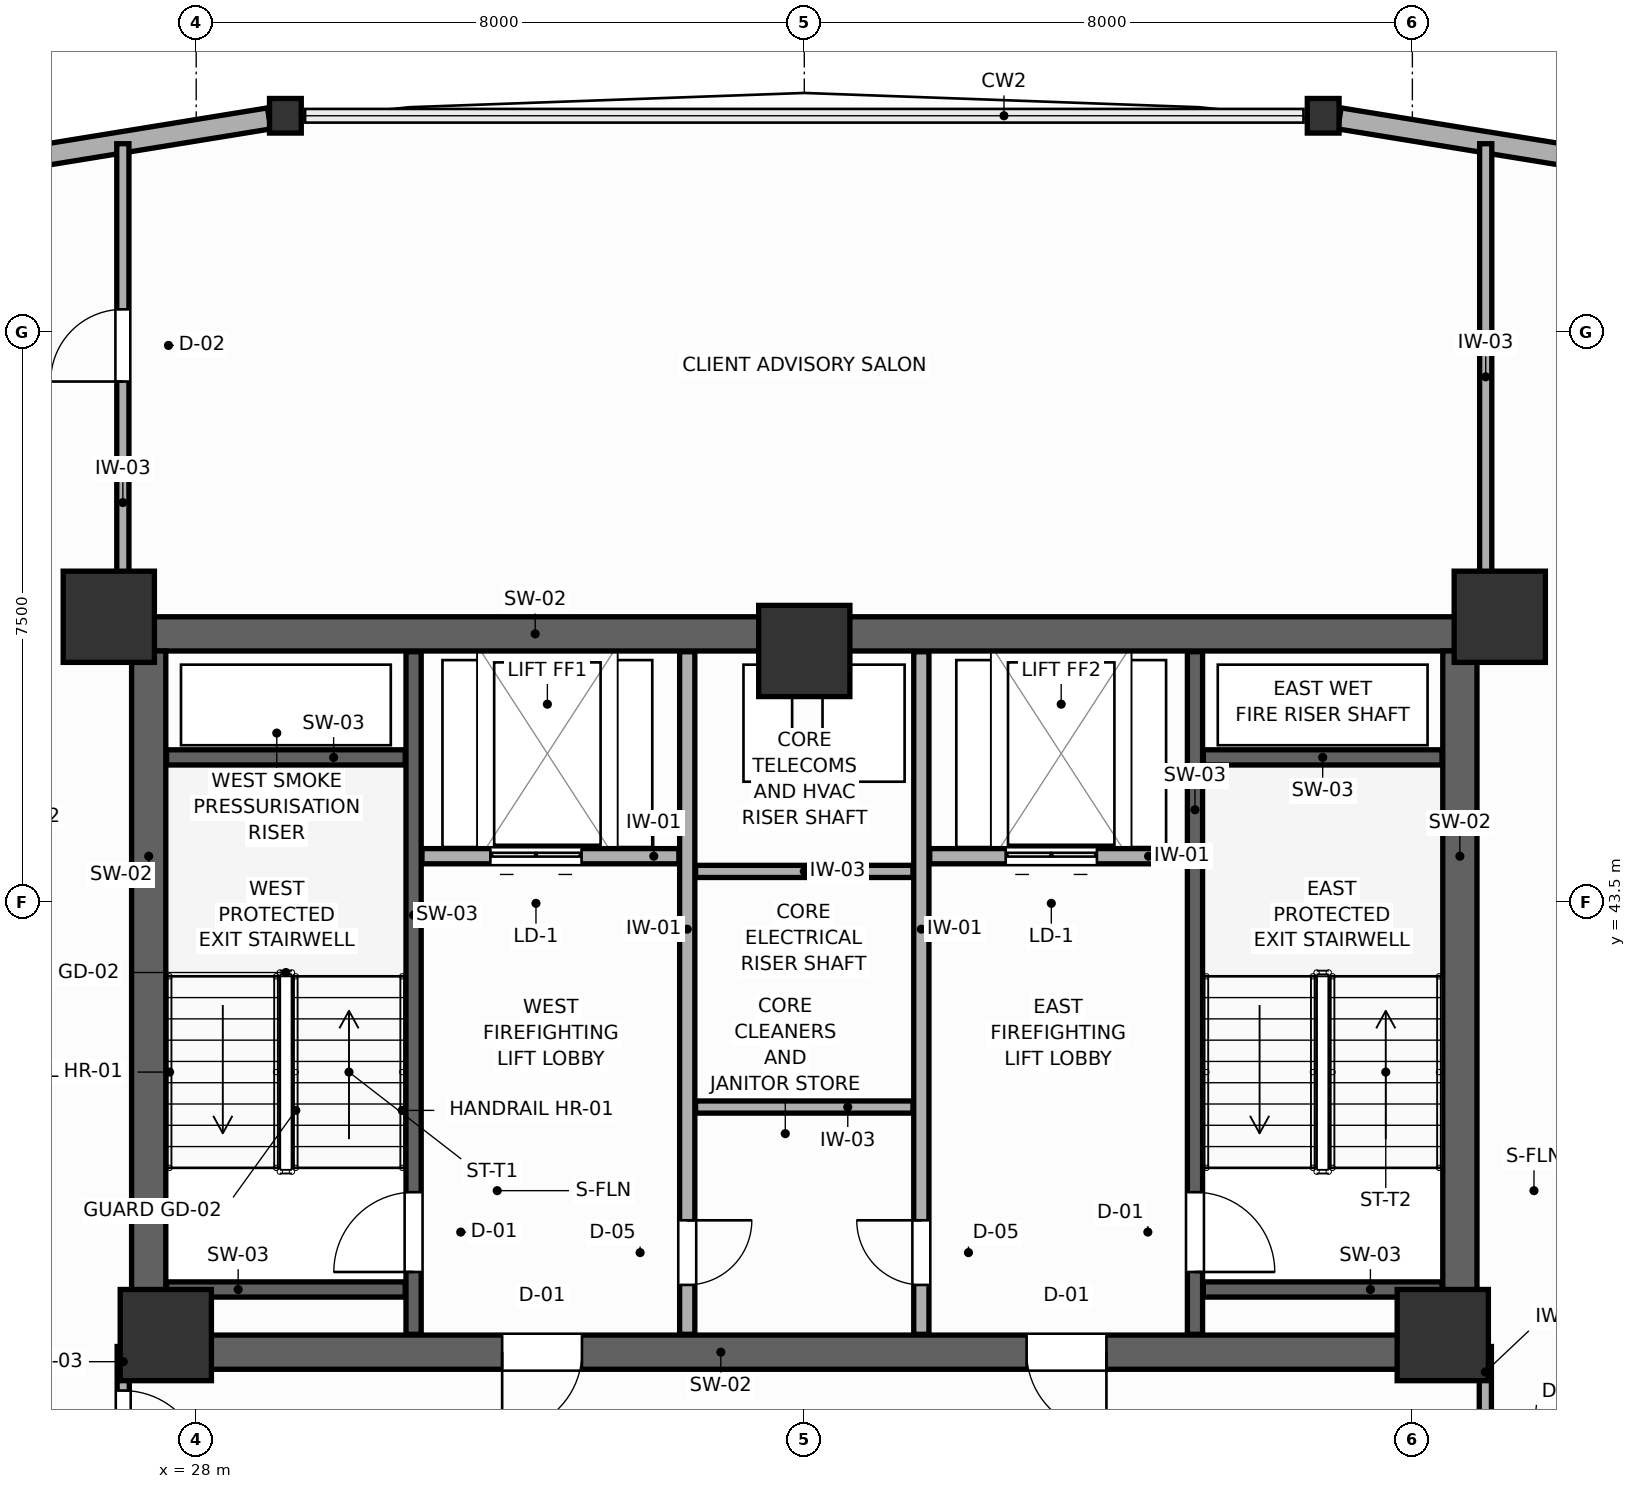
"""IFC4 building model, lengths in metres.
Left out: names, types, materials, properties, quantities, classifications, styles, units other than length and angle.
Written with IfcOpenShell. Run it as: python <this file> out.ifc"""

import sys

from ifc_helpers import new_model, si_unit, direction, frame, frame_2d, origin, origin_2d, place, context, subcontext, project, spatial, rectangle, i_section, extrude, source, transform, mapped, element, fill, save


model = new_model("IFC4")
c1 = context("Model", 3, precision=1e-05, world=origin(), true_north=direction((0.0, 1.0)))
c2 = subcontext(c1, "Body", "Model", "MODEL_VIEW")
j1 = project(units=[si_unit("LENGTHUNIT", "METRE"), si_unit("PLANEANGLEUNIT", "RADIAN")], contexts=[c1])
p1 = place(None, origin())
s1 = spatial("IfcSite", under=j1, at=p1, CompositionType="ELEMENT")
p2 = place(p1, origin())
s2 = spatial("IfcBuilding", under=s1, at=p2, CompositionType="ELEMENT")
p3 = place(p2, frame((0.0, 0.0, 124.2)))
s3 = spatial("IfcBuildingStorey", under=s2, at=p3, CompositionType="ELEMENT", Elevation=124.2)
p4 = place(p3, frame((27.15, 47.025, 0.0), z_axis=(0.0, 0.0, 1.0), x_axis=(1.0, 0.0, 0.0)))
e1 = element("IfcWall", 1, at=p4, inside=s3, PredefinedType="SHEAR", context=c2, shape_type="SweptSolid", body=[
    extrude(rectangle(XDim=17.7, YDim=0.45, at=frame_2d((8.85, 0.0))), origin(), (0.0, 0.0, 1.0), 3.6),
])
p5 = place(p3, frame((27.15, 37.575, 0.0), z_axis=(0.0, 0.0, 1.0), x_axis=(1.0, 0.0, 0.0)))
e2 = element("IfcWall", 2, at=p5, inside=s3, PredefinedType="SHEAR", context=c2, shape_type="SweptSolid", body=[
    extrude(rectangle(XDim=17.7, YDim=0.45, at=frame_2d((8.85, 0.0))), origin(), (0.0, 0.0, 1.0), 3.6),
])
p6 = place(p5, frame((4.875, 0.0, 0.0)))
e3 = element("IfcOpeningElement", 3, at=p6, cuts=e2, PredefinedType="OPENING", context=c2, shape_type="SweptSolid", body=[
    extrude(rectangle(XDim=1.05, YDim=2.1, at=frame_2d((0.525, 1.05))), frame((0.0, 0.235, 0.0), z_axis=(0.0, -1.0, 0.0), x_axis=(1.0, 0.0, 0.0)), (0.0, 0.0, 1.0), 0.47),
])
p7 = place(p5, frame((11.775, 0.0, 0.0)))
e4 = element("IfcOpeningElement", 4, at=p7, cuts=e2, PredefinedType="OPENING", context=c2, shape_type="SweptSolid", body=[
    extrude(rectangle(XDim=1.05, YDim=2.1, at=frame_2d((0.525, 1.05))), frame((0.0, 0.235, 0.0), z_axis=(0.0, -1.0, 0.0), x_axis=(1.0, 0.0, 0.0)), (0.0, 0.0, 1.0), 0.47),
])
for number, where, z_axis, x_axis in (
    (5, (27.375, 37.8, 0.0), (0.0, 0.0, 1.0), (0.0, 1.0, 0.0)),
    (6, (44.625, 37.8, 0.0), (0.0, 0.0, 1.0), (0.0, 1.0, 0.0)),
):
    element("IfcWall", number, at=place(p3, frame(where, z_axis=z_axis, x_axis=x_axis)), inside=s3, PredefinedType="SHEAR", context=c2, shape_type="SweptSolid", body=[
        extrude(rectangle(XDim=9.0, YDim=0.45, at=frame_2d((4.5, 0.0))), origin(), (0.0, 0.0, 1.0), 3.6),
    ])
m1 = source(origin(), c2, "Body", "SweptSolid", [
    extrude(rectangle(XDim=1.2, YDim=1.2, at=origin_2d()), origin(), (0.0, 0.0, 1.0), 3.6),
])
for number, where, z_axis, x_axis in (
    (7, (26.85, 47.25, 0.0), (0.0, 0.0, 1.0), (1.0, 0.0, 0.0)),
    (8, (45.15, 47.25, 0.0), (0.0, 0.0, 1.0), (1.0, 0.0, 0.0)),
    (9, (27.6, 37.8, 0.0), (0.0, 0.0, 1.0), (1.0, 0.0, 0.0)),
    (10, (44.4, 37.8, 0.0), (0.0, 0.0, 1.0), (1.0, 0.0, 0.0)),
    (11, (36.0, 46.8, 0.0), (0.0, 0.0, 1.0), (1.0, 0.0, 0.0)),
):
    element("IfcColumn", number, at=place(p3, frame(where, z_axis=z_axis, x_axis=x_axis)), inside=s3, PredefinedType="COLUMN", context=c2, shape_type="MappedRepresentation", body=[
        mapped(m1, transform((0.0, 0.0, 0.0), scale=1.0)),
    ])
m2 = source(origin(), c2, "Body", "SweptSolid", [
    extrude(i_section(OverallWidth=0.418, OverallDepth=0.455, WebThickness=0.039, FlangeThickness=0.063, FilletRadius=0.015, at=origin_2d()), origin(), (0.0, 0.0, 1.0), 3.6),
])
for number, where, z_axis, x_axis in (
    (12, (42.827, 53.841, 0.0), (0.0, 0.0, 1.0), (1.0, 0.0, 0.0)),
    (13, (29.173, 53.841, 0.0), (0.0, 0.0, 1.0), (1.0, 0.0, 0.0)),
):
    element("IfcColumn", number, at=place(p3, frame(where, z_axis=z_axis, x_axis=x_axis)), inside=s3, PredefinedType="COLUMN", context=c2, shape_type="MappedRepresentation", body=[
        mapped(m2, transform((0.0, 0.0, 0.0), scale=1.0)),
    ])
p8 = place(p3, frame((58.42, 51.306, 0.0), z_axis=(0.0, 0.0, 1.0), x_axis=(-0.987036263752, 0.160497395736, 0.0)))
e14 = element("IfcWall", 14, at=p8, inside=s3, PredefinedType="SOLIDWALL", context=c2, shape_type="SweptSolid", body=[
    extrude(rectangle(XDim=15.581, YDim=0.28, at=frame_2d((7.791, 0.0))), origin(), (0.0, 0.0, 1.0), 3.0),
])
p9 = place(p3, frame((28.959, 53.806, 0.0), z_axis=(0.0, 0.0, 1.0), x_axis=(-0.987036263752, -0.160497395736, 0.0)))
e15 = element("IfcWall", 15, at=p9, inside=s3, PredefinedType="SOLIDWALL", context=c2, shape_type="SweptSolid", body=[
    extrude(rectangle(XDim=15.581, YDim=0.28, at=frame_2d((7.791, 0.0))), origin(), (0.0, 0.0, 1.0), 2.95),
])
p10 = place(p3, frame((30.86, 37.81, 0.0), z_axis=(0.0, 0.0, 1.0), x_axis=(0.0, 1.0, 0.0)))
e16 = element("IfcWall", 16, at=p10, inside=s3, PredefinedType="SHEAR", context=c2, shape_type="SweptSolid", body=[
    extrude(rectangle(XDim=8.98, YDim=0.2, at=frame_2d((4.49, 0.0))), origin(), (0.0, 0.0, 1.0), 3.6),
])
p11 = place(p10, frame((0.82, 0.0, 0.0)))
e17 = element("IfcOpeningElement", 17, at=p11, cuts=e16, PredefinedType="OPENING", context=c2, shape_type="SweptSolid", body=[
    extrude(rectangle(XDim=1.05, YDim=2.1, at=frame_2d((0.525, 1.05))), frame((0.0, 0.11, 0.0), z_axis=(0.0, -1.0, 0.0), x_axis=(1.0, 0.0, 0.0)), (0.0, 0.0, 1.0), 0.22),
])
for number, where, z_axis, x_axis in (
    (18, (27.61, 45.4, 0.0), (0.0, 0.0, 1.0), (1.0, 0.0, 0.0)),
    (19, (27.61, 38.4, 0.0), (0.0, 0.0, 1.0), (1.0, 0.0, 0.0)),
):
    element("IfcWall", number, at=place(p3, frame(where, z_axis=z_axis, x_axis=x_axis)), inside=s3, PredefinedType="SHEAR", context=c2, shape_type="SweptSolid", body=[
        extrude(rectangle(XDim=3.14, YDim=0.2, at=frame_2d((1.57, 0.0))), origin(), (0.0, 0.0, 1.0), 3.6),
    ])
p12 = place(p3, frame((41.14, 37.81, 0.0), z_axis=(0.0, 0.0, 1.0), x_axis=(0.0, 1.0, 0.0)))
e20 = element("IfcWall", 20, at=p12, inside=s3, PredefinedType="SHEAR", context=c2, shape_type="SweptSolid", body=[
    extrude(rectangle(XDim=8.98, YDim=0.2, at=frame_2d((4.49, 0.0))), origin(), (0.0, 0.0, 1.0), 3.6),
])
p13 = place(p12, frame((0.82, 0.0, 0.0)))
e21 = element("IfcOpeningElement", 21, at=p13, cuts=e20, PredefinedType="OPENING", context=c2, shape_type="SweptSolid", body=[
    extrude(rectangle(XDim=1.05, YDim=2.1, at=frame_2d((0.525, 1.05))), frame((0.0, 0.11, 0.0), z_axis=(0.0, -1.0, 0.0), x_axis=(1.0, 0.0, 0.0)), (0.0, 0.0, 1.0), 0.22),
])
for number, where, z_axis, x_axis in (
    (22, (41.25, 45.4, 0.0), (0.0, 0.0, 1.0), (1.0, 0.0, 0.0)),
    (23, (41.25, 38.4, 0.0), (0.0, 0.0, 1.0), (1.0, 0.0, 0.0)),
):
    element("IfcWall", number, at=place(p3, frame(where, z_axis=z_axis, x_axis=x_axis)), inside=s3, PredefinedType="SHEAR", context=c2, shape_type="SweptSolid", body=[
        extrude(rectangle(XDim=3.14, YDim=0.2, at=frame_2d((1.57, 0.0))), origin(), (0.0, 0.0, 1.0), 3.6),
    ])
p14 = place(p3, frame((30.97, 44.1, 0.0), z_axis=(0.0, 0.0, 1.0), x_axis=(1.0, 0.0, 0.0)))
e24 = element("IfcWall", 24, at=p14, inside=s3, PredefinedType="PARTITIONING", context=c2, shape_type="SweptSolid", body=[
    extrude(rectangle(XDim=3.38, YDim=0.2, at=frame_2d((1.69, 0.0))), origin(), (0.0, 0.0, 1.0), 3.4),
])
p15 = place(p14, frame((0.9, 0.0, 0.0)))
e25 = element("IfcOpeningElement", 25, at=p15, cuts=e24, PredefinedType="OPENING", context=c2, shape_type="SweptSolid", body=[
    extrude(rectangle(XDim=1.2, YDim=2.1, at=frame_2d((0.6, 1.05))), frame((0.0, 0.11, 0.0), z_axis=(0.0, -1.0, 0.0), x_axis=(1.0, 0.0, 0.0)), (0.0, 0.0, 1.0), 0.22),
])
p16 = place(p3, frame((37.65, 44.1, 0.0), z_axis=(0.0, 0.0, 1.0), x_axis=(1.0, 0.0, 0.0)))
e26 = element("IfcWall", 26, at=p16, inside=s3, PredefinedType="PARTITIONING", context=c2, shape_type="SweptSolid", body=[
    extrude(rectangle(XDim=3.38, YDim=0.2, at=frame_2d((1.69, 0.0))), origin(), (0.0, 0.0, 1.0), 3.4),
])
p17 = place(p16, frame((1.0, 0.0, 0.0)))
e27 = element("IfcOpeningElement", 27, at=p17, cuts=e26, PredefinedType="OPENING", context=c2, shape_type="SweptSolid", body=[
    extrude(rectangle(XDim=1.2, YDim=2.1, at=frame_2d((0.6, 1.05))), frame((0.0, 0.11, 0.0), z_axis=(0.0, -1.0, 0.0), x_axis=(1.0, 0.0, 0.0)), (0.0, 0.0, 1.0), 0.22),
])
p18 = place(p3, frame((34.46, 37.81, 0.0), z_axis=(0.0, 0.0, 1.0), x_axis=(0.0, 1.0, 0.0)))
e28 = element("IfcWall", 28, at=p18, inside=s3, PredefinedType="PARTITIONING", context=c2, shape_type="SweptSolid", body=[
    extrude(rectangle(XDim=8.98, YDim=0.2, at=frame_2d((4.49, 0.0))), origin(), (0.0, 0.0, 1.0), 3.4),
])
p19 = place(p18, frame((0.65, 0.0, 0.0)))
e29 = element("IfcOpeningElement", 29, at=p19, cuts=e28, PredefinedType="OPENING", context=c2, shape_type="SweptSolid", body=[
    extrude(rectangle(XDim=0.85, YDim=2.05, at=frame_2d((0.425, 1.025))), frame((0.0, 0.11, 0.0), z_axis=(0.0, -1.0, 0.0), x_axis=(1.0, 0.0, 0.0)), (0.0, 0.0, 1.0), 0.22),
])
p20 = place(p3, frame((37.54, 37.81, 0.0), z_axis=(0.0, 0.0, 1.0), x_axis=(0.0, 1.0, 0.0)))
e30 = element("IfcWall", 30, at=p20, inside=s3, PredefinedType="PARTITIONING", context=c2, shape_type="SweptSolid", body=[
    extrude(rectangle(XDim=8.98, YDim=0.2, at=frame_2d((4.49, 0.0))), origin(), (0.0, 0.0, 1.0), 3.4),
])
p21 = place(p20, frame((0.65, 0.0, 0.0)))
e31 = element("IfcOpeningElement", 31, at=p21, cuts=e30, PredefinedType="OPENING", context=c2, shape_type="SweptSolid", body=[
    extrude(rectangle(XDim=0.85, YDim=2.05, at=frame_2d((0.425, 1.025))), frame((0.0, 0.11, 0.0), z_axis=(0.0, -1.0, 0.0), x_axis=(1.0, 0.0, 0.0)), (0.0, 0.0, 1.0), 0.22),
])
for number, where, z_axis, x_axis in (
    (32, (34.57, 40.8, 0.0), (0.0, 0.0, 1.0), (1.0, 0.0, 0.0)),
    (33, (34.57, 43.9, 0.0), (0.0, 0.0, 1.0), (1.0, 0.0, 0.0)),
):
    element("IfcWall", number, at=place(p3, frame(where, z_axis=z_axis, x_axis=x_axis)), inside=s3, PredefinedType="PARTITIONING", context=c2, shape_type="SweptSolid", body=[
        extrude(rectangle(XDim=2.86, YDim=0.16, at=frame_2d((1.43, 0.0))), origin(), (0.0, 0.0, 1.0), 3.4),
    ])
p22 = place(p3, frame((27.04, 35.54, 0.0), z_axis=(0.0, 0.0, 1.0), x_axis=(0.0, 1.0, 0.0)))
e34 = element("IfcWall", 34, at=p22, inside=s3, PredefinedType="PARTITIONING", context=c2, shape_type="SweptSolid", body=[
    extrude(rectangle(XDim=2.11, YDim=0.16, at=frame_2d((1.055, 0.0))), origin(), (0.0, 0.0, 1.0), 3.4),
])
p23 = place(p22, frame((0.48, 0.0, 0.0)))
e35 = element("IfcOpeningElement", 35, at=p23, cuts=e34, PredefinedType="OPENING", context=c2, shape_type="SweptSolid", body=[
    extrude(rectangle(XDim=1.05, YDim=2.1, at=frame_2d((0.525, 1.05))), frame((0.0, 0.09, 0.0), z_axis=(0.0, -1.0, 0.0), x_axis=(1.0, 0.0, 0.0)), (0.0, 0.0, 1.0), 0.18),
])
p24 = place(p3, frame((44.96, 35.0, 0.0), z_axis=(0.0, 0.0, 1.0), x_axis=(0.0, 1.0, 0.0)))
e36 = element("IfcWall", 36, at=p24, inside=s3, PredefinedType="PARTITIONING", context=c2, shape_type="SweptSolid", body=[
    extrude(rectangle(XDim=2.65, YDim=0.16, at=frame_2d((1.325, 0.0))), origin(), (0.0, 0.0, 1.0), 3.4),
])
p25 = place(p24, frame((0.75, 0.0, 0.0)))
e37 = element("IfcOpeningElement", 37, at=p25, cuts=e36, PredefinedType="OPENING", context=c2, shape_type="SweptSolid", body=[
    extrude(rectangle(XDim=1.05, YDim=2.1, at=frame_2d((0.525, 1.05))), frame((0.0, 0.09, 0.0), z_axis=(0.0, -1.0, 0.0), x_axis=(1.0, 0.0, 0.0)), (0.0, 0.0, 1.0), 0.18),
])
p26 = place(p3, frame((27.035, 47.34, 0.0), z_axis=(0.0, 0.0, 1.0), x_axis=(0.0, 1.0, 0.0)))
e38 = element("IfcWall", 38, at=p26, inside=s3, PredefinedType="PARTITIONING", context=c2, shape_type="SweptSolid", body=[
    extrude(rectangle(XDim=6.133, YDim=0.16, at=frame_2d((3.067, 0.0))), origin(), (0.0, 0.0, 1.0), 3.4),
])
p27 = place(p26, frame((3.005, 0.0, 0.0)))
e39 = element("IfcOpeningElement", 39, at=p27, cuts=e38, PredefinedType="OPENING", context=c2, shape_type="SweptSolid", body=[
    extrude(rectangle(XDim=0.95, YDim=2.05, at=frame_2d((0.475, 1.025))), frame((0.0, 0.09, 0.0), z_axis=(0.0, -1.0, 0.0), x_axis=(1.0, 0.0, 0.0)), (0.0, 0.0, 1.0), 0.18),
])
p28 = place(p3, frame((44.965, 47.34, 0.0), z_axis=(0.0, 0.0, 1.0), x_axis=(0.0, 1.0, 0.0)))
e40 = element("IfcWall", 40, at=p28, inside=s3, PredefinedType="PARTITIONING", context=c2, shape_type="SweptSolid", body=[
    extrude(rectangle(XDim=6.133, YDim=0.16, at=frame_2d((3.067, 0.0))), origin(), (0.0, 0.0, 1.0), 3.4),
])
p29 = place(p11, origin())
e41 = element("IfcDoor", 41, at=p29, inside=s3, OperationType="SINGLE_SWING_LEFT", PredefinedType="DOOR", context=c2, shape_type="SweptSolid", body=[
    extrude(rectangle(XDim=1.05, YDim=2.1, at=frame_2d((0.525, 1.05))), frame((0.0, 0.025, 0.0), z_axis=(0.0, -1.0, 0.0), x_axis=(1.0, 0.0, 0.0)), (0.0, 0.0, 1.0), 0.05),
])
fill(e17, e41)
p30 = place(p13, frame((1.05, 0.0, 0.0), z_axis=(0.0, 0.0, 1.0), x_axis=(-1.0, 0.0, 0.0)))
e42 = element("IfcDoor", 42, at=p30, inside=s3, OperationType="SINGLE_SWING_RIGHT", PredefinedType="DOOR", context=c2, shape_type="SweptSolid", body=[
    extrude(rectangle(XDim=1.05, YDim=2.1, at=frame_2d((0.525, 1.05))), frame((0.0, 0.025, 0.0), z_axis=(0.0, -1.0, 0.0), x_axis=(1.0, 0.0, 0.0)), (0.0, 0.0, 1.0), 0.05),
])
fill(e21, e42)
p31 = place(p15, origin())
e43 = element("IfcDoor", 43, at=p31, inside=s3, OperationType="DOUBLE_DOOR_SLIDING", PredefinedType="DOOR", context=c2, shape_type="SweptSolid", body=[
    extrude(rectangle(XDim=1.2, YDim=2.1, at=frame_2d((0.6, 1.05))), frame((0.0, 0.025, 0.0), z_axis=(0.0, -1.0, 0.0), x_axis=(1.0, 0.0, 0.0)), (0.0, 0.0, 1.0), 0.05),
])
fill(e25, e43)
p32 = place(p17, origin())
e44 = element("IfcDoor", 44, at=p32, inside=s3, OperationType="DOUBLE_DOOR_SLIDING", PredefinedType="DOOR", context=c2, shape_type="SweptSolid", body=[
    extrude(rectangle(XDim=1.2, YDim=2.1, at=frame_2d((0.6, 1.05))), frame((0.0, 0.025, 0.0), z_axis=(0.0, -1.0, 0.0), x_axis=(1.0, 0.0, 0.0)), (0.0, 0.0, 1.0), 0.05),
])
fill(e27, e44)
p33 = place(p19, frame((0.85, 0.0, 0.0), z_axis=(0.0, 0.0, 1.0), x_axis=(-1.0, 0.0, 0.0)))
e45 = element("IfcDoor", 45, at=p33, inside=s3, OperationType="SINGLE_SWING_LEFT", PredefinedType="DOOR", context=c2, shape_type="SweptSolid", body=[
    extrude(rectangle(XDim=0.85, YDim=2.05, at=frame_2d((0.425, 1.025))), frame((0.0, 0.025, 0.0), z_axis=(0.0, -1.0, 0.0), x_axis=(1.0, 0.0, 0.0)), (0.0, 0.0, 1.0), 0.05),
])
fill(e29, e45)
p34 = place(p21, origin())
e46 = element("IfcDoor", 46, at=p34, inside=s3, OperationType="SINGLE_SWING_RIGHT", PredefinedType="DOOR", context=c2, shape_type="SweptSolid", body=[
    extrude(rectangle(XDim=0.85, YDim=2.05, at=frame_2d((0.425, 1.025))), frame((0.0, 0.025, 0.0), z_axis=(0.0, -1.0, 0.0), x_axis=(1.0, 0.0, 0.0)), (0.0, 0.0, 1.0), 0.05),
])
fill(e31, e46)
p35 = place(p23, frame((1.05, 0.0, 0.0), z_axis=(0.0, 0.0, 1.0), x_axis=(-1.0, 0.0, 0.0)))
e47 = element("IfcDoor", 47, at=p35, inside=s3, OperationType="SINGLE_SWING_RIGHT", PredefinedType="DOOR", context=c2, shape_type="SweptSolid", body=[
    extrude(rectangle(XDim=1.05, YDim=2.1, at=frame_2d((0.525, 1.05))), frame((0.0, 0.025, 0.0), z_axis=(0.0, -1.0, 0.0), x_axis=(1.0, 0.0, 0.0)), (0.0, 0.0, 1.0), 0.05),
])
fill(e35, e47)
p36 = place(p27, origin())
e48 = element("IfcDoor", 48, at=p36, inside=s3, OperationType="SINGLE_SWING_LEFT", PredefinedType="DOOR", context=c2, shape_type="SweptSolid", body=[
    extrude(rectangle(XDim=0.95, YDim=2.05, at=frame_2d((0.475, 1.025))), frame((0.0, 0.025, 0.0), z_axis=(0.0, -1.0, 0.0), x_axis=(1.0, 0.0, 0.0)), (0.0, 0.0, 1.0), 0.05),
])
fill(e39, e48)
p37 = place(p6, frame((1.05, 0.0, 0.0), z_axis=(0.0, 0.0, 1.0), x_axis=(-1.0, 0.0, 0.0)))
e49 = element("IfcDoor", 49, at=p37, inside=s3, OperationType="SINGLE_SWING_RIGHT", PredefinedType="DOOR", context=c2, shape_type="SweptSolid", body=[
    extrude(rectangle(XDim=1.05, YDim=2.1, at=frame_2d((0.525, 1.05))), frame((0.0, 0.025, 0.0), z_axis=(0.0, -1.0, 0.0), x_axis=(1.0, 0.0, 0.0)), (0.0, 0.0, 1.0), 0.05),
])
fill(e3, e49)
p38 = place(p7, frame((1.05, 0.0, 0.0), z_axis=(0.0, 0.0, 1.0), x_axis=(-1.0, 0.0, 0.0)))
e50 = element("IfcDoor", 50, at=p38, inside=s3, OperationType="SINGLE_SWING_LEFT", PredefinedType="DOOR", context=c2, shape_type="SweptSolid", body=[
    extrude(rectangle(XDim=1.05, YDim=2.1, at=frame_2d((0.525, 1.05))), frame((0.0, 0.025, 0.0), z_axis=(0.0, -1.0, 0.0), x_axis=(1.0, 0.0, 0.0)), (0.0, 0.0, 1.0), 0.05),
])
fill(e4, e50)
save(model, sys.argv[1])
